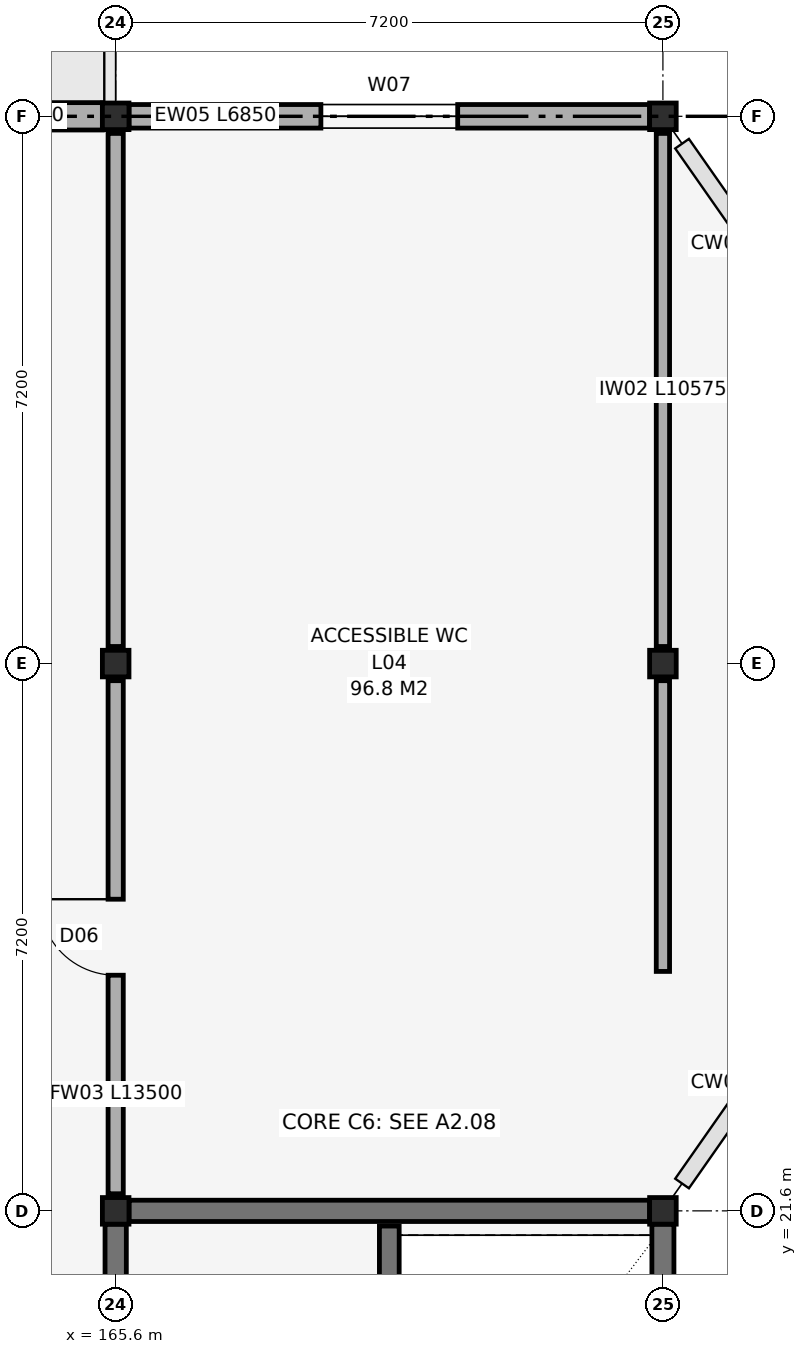
"""IFC4 building model, lengths in metres.
Left out: names, types, materials, properties, quantities, classifications, styles, units other than length and angle.
Written with IfcOpenShell. Run it as: python <this file> out.ifc"""

import sys

from ifc_helpers import new_model, si_unit, direction, frame, frame_2d, origin, origin_2d, place, context, subcontext, project, spatial, rectangle, i_section, extrude, element, fill, save


model = new_model("IFC4")
c1 = context("Model", 3, precision=1e-05, world=origin(), true_north=direction((0.0, 1.0)))
c2 = subcontext(c1, "Body", "Model", "MODEL_VIEW")
j1 = project(units=[si_unit("LENGTHUNIT", "METRE"), si_unit("PLANEANGLEUNIT", "RADIAN")], contexts=[c1])
p1 = place(None, origin())
s1 = spatial("IfcSite", under=j1, at=p1, CompositionType="ELEMENT")
p2 = place(p1, origin())
s2 = spatial("IfcBuilding", under=s1, at=p2, CompositionType="ELEMENT")
p3 = place(p2, frame((0.0, 0.0, 19.2)))
s3 = spatial("IfcBuildingStorey", under=s2, at=p3, CompositionType="ELEMENT", Elevation=19.2)
for number, where, z_axis, x_axis in (
    (1, (165.6, 21.6, 0.0), (0.0, 0.0, 1.0), (1.0, 0.0, 0.0)),
    (2, (165.6, 28.8, 0.0), (0.0, 0.0, 1.0), (1.0, 0.0, 0.0)),
    (3, (165.6, 36.0, 0.0), (0.0, 0.0, 1.0), (1.0, 0.0, 0.0)),
    (4, (172.8, 21.6, 0.0), (0.0, 0.0, 1.0), (1.0, 0.0, 0.0)),
    (5, (172.8, 28.8, 0.0), (0.0, 0.0, 1.0), (1.0, 0.0, 0.0)),
    (6, (172.8, 36.0, 0.0), (0.0, 0.0, 1.0), (1.0, 0.0, 0.0)),
):
    element("IfcColumn", number, at=place(p3, frame(where, z_axis=z_axis, x_axis=x_axis)), inside=s3, PredefinedType="COLUMN", context=c2, shape_type="SweptSolid", body=[
        extrude(i_section(OverallWidth=0.35, OverallDepth=0.35, WebThickness=0.012, FlangeThickness=0.019, FilletRadius=0.02, at=origin_2d()), origin(), (0.0, 0.0, 1.0), 4.2),
    ])
p4 = place(p3, frame((158.575, 36.0, 0.0), z_axis=(0.0, 0.0, 1.0), x_axis=(1.0, 0.0, 0.0)))
e7 = element("IfcWall", 7, at=p4, inside=s3, PredefinedType="SOLIDWALL", context=c2, shape_type="SweptSolid", body=[
    extrude(rectangle(XDim=6.85, YDim=0.36, at=frame_2d((3.425, 0.0))), origin(), (0.0, 0.0, 1.0), 3.64),
])
p5 = place(p4, frame((2.875, 0.0, 0.0)))
e8 = element("IfcOpeningElement", 8, at=p5, cuts=e7, PredefinedType="OPENING", context=c2, shape_type="SweptSolid", body=[
    extrude(rectangle(XDim=1.1, YDim=2.2, at=frame_2d((0.55, 1.1))), frame((0.0, 0.195, 0.0), z_axis=(0.0, -1.0, 0.0), x_axis=(1.0, 0.0, 0.0)), (0.0, 0.0, 1.0), 0.39),
])
p6 = place(p3, frame((165.775, 36.0, 0.0), z_axis=(0.0, 0.0, 1.0), x_axis=(1.0, 0.0, 0.0)))
e9 = element("IfcWall", 9, at=p6, inside=s3, PredefinedType="SOLIDWALL", context=c2, shape_type="SweptSolid", body=[
    extrude(rectangle(XDim=6.85, YDim=0.31, at=frame_2d((3.425, 0.0))), origin(), (0.0, 0.0, 1.0), 3.64),
])
p7 = place(p6, frame((2.525, 0.0, 0.95)))
e10 = element("IfcOpeningElement", 10, at=p7, cuts=e9, PredefinedType="OPENING", context=c2, shape_type="SweptSolid", body=[
    extrude(rectangle(XDim=1.8, YDim=2.0, at=frame_2d((0.9, 1.0))), frame((0.0, 0.17, 0.0), z_axis=(0.0, -1.0, 0.0), x_axis=(1.0, 0.0, 0.0)), (0.0, 0.0, 1.0), 0.34),
])
p8 = place(p3, frame((165.775, 21.6, 0.0), z_axis=(0.0, 0.0, 1.0), x_axis=(1.0, 0.0, 0.0)))
e11 = element("IfcWall", 11, at=p8, inside=s3, PredefinedType="SHEAR", context=c2, shape_type="SweptSolid", body=[
    extrude(rectangle(XDim=6.85, YDim=0.28, at=frame_2d((3.425, 0.0))), origin(), (0.0, 0.0, 1.0), 3.98),
])
p9 = place(p3, frame((165.6, 14.644, 0.0), z_axis=(0.0, 0.0, 1.0), x_axis=(0.0, 1.0, 0.0)))
e12 = element("IfcWall", 12, at=p9, inside=s3, PredefinedType="SHEAR", context=c2, shape_type="SweptSolid", body=[
    extrude(rectangle(XDim=6.781, YDim=0.28, at=frame_2d((3.391, 0.0))), origin(), (0.0, 0.0, 1.0), 3.98),
])
p10 = place(p9, frame((2.591, 0.0, 0.0)))
e13 = element("IfcOpeningElement", 13, at=p10, cuts=e12, PredefinedType="OPENING", context=c2, shape_type="SweptSolid", body=[
    extrude(rectangle(XDim=1.6, YDim=2.2, at=frame_2d((0.8, 1.1))), frame((0.0, 0.155, 0.0), z_axis=(0.0, -1.0, 0.0), x_axis=(1.0, 0.0, 0.0)), (0.0, 0.0, 1.0), 0.31),
])
p11 = place(p3, frame((172.8, 14.575, 0.0), z_axis=(0.0, 0.0, 1.0), x_axis=(0.0, 1.0, 0.0)))
e14 = element("IfcWall", 14, at=p11, inside=s3, PredefinedType="SHEAR", context=c2, shape_type="SweptSolid", body=[
    extrude(rectangle(XDim=6.85, YDim=0.29, at=frame_2d((3.425, 0.0))), origin(), (0.0, 0.0, 1.0), 3.98),
])
p12 = place(p3, frame((169.2, 7.4, 0.0), z_axis=(0.0, 0.0, 1.0), x_axis=(0.0, 1.0, 0.0)))
e15 = element("IfcWall", 15, at=p12, inside=s3, PredefinedType="SHEAR", context=c2, shape_type="SweptSolid", body=[
    extrude(rectangle(XDim=14.0, YDim=0.26, at=frame_2d((7.0, 0.0))), origin(), (0.0, 0.0, 1.0), 3.98),
])
p13 = place(p12, frame((1.65, 0.0, 0.0)))
e16 = element("IfcOpeningElement", 16, at=p13, cuts=e15, PredefinedType="OPENING", context=c2, shape_type="SweptSolid", body=[
    extrude(rectangle(XDim=1.1, YDim=2.15, at=frame_2d((0.55, 1.075))), frame((0.0, 0.145, 0.0), z_axis=(0.0, -1.0, 0.0), x_axis=(1.0, 0.0, 0.0)), (0.0, 0.0, 1.0), 0.29),
])
p14 = place(p12, frame((10.6, 0.0, 0.0)))
e17 = element("IfcOpeningElement", 17, at=p14, cuts=e15, PredefinedType="OPENING", context=c2, shape_type="SweptSolid", body=[
    extrude(rectangle(XDim=1.2, YDim=2.25, at=frame_2d((0.6, 1.125))), frame((0.0, 0.145, 0.0), z_axis=(0.0, -1.0, 0.0), x_axis=(1.0, 0.0, 0.0)), (0.0, 0.0, 1.0), 0.29),
])
p15 = place(p3, frame((165.6, 21.825, 0.0), z_axis=(0.0, 0.0, 1.0), x_axis=(0.0, 1.0, 0.0)))
e18 = element("IfcWall", 18, at=p15, inside=s3, PredefinedType="SOLIDWALL", context=c2, shape_type="SweptSolid", body=[
    extrude(rectangle(XDim=6.75, YDim=0.2, at=frame_2d((3.375, 0.0))), origin(), (0.0, 0.0, 1.0), 3.64),
])
p16 = place(p15, frame((2.875, 0.0, 0.0)))
e19 = element("IfcOpeningElement", 19, at=p16, cuts=e18, PredefinedType="OPENING", context=c2, shape_type="SweptSolid", body=[
    extrude(rectangle(XDim=1.0, YDim=2.1, at=frame_2d((0.5, 1.05))), frame((0.0, 0.115, 0.0), z_axis=(0.0, -1.0, 0.0), x_axis=(1.0, 0.0, 0.0)), (0.0, 0.0, 1.0), 0.23),
])
p17 = place(p3, frame((165.6, 29.025, 0.0), z_axis=(0.0, 0.0, 1.0), x_axis=(0.0, 1.0, 0.0)))
e20 = element("IfcWall", 20, at=p17, inside=s3, PredefinedType="SOLIDWALL", context=c2, shape_type="SweptSolid", body=[
    extrude(rectangle(XDim=6.75, YDim=0.2, at=frame_2d((3.375, 0.0))), origin(), (0.0, 0.0, 1.0), 3.64),
])
p18 = place(p3, frame((172.8, 24.75, 0.0), z_axis=(0.0, 0.0, 1.0), x_axis=(0.0, 1.0, 0.0)))
e21 = element("IfcWall", 21, at=p18, inside=s3, PredefinedType="PARTITIONING", context=c2, shape_type="SweptSolid", body=[
    extrude(rectangle(XDim=3.825, YDim=0.175, at=frame_2d((1.913, 0.0))), origin(), (0.0, 0.0, 1.0), 3.64),
])
p19 = place(p3, frame((172.8, 29.025, 0.0), z_axis=(0.0, 0.0, 1.0), x_axis=(0.0, 1.0, 0.0)))
e22 = element("IfcWall", 22, at=p19, inside=s3, PredefinedType="PARTITIONING", context=c2, shape_type="SweptSolid", body=[
    extrude(rectangle(XDim=6.75, YDim=0.175, at=frame_2d((3.375, 0.0))), origin(), (0.0, 0.0, 1.0), 3.68),
])
p20 = place(p7, origin())
e23 = element("IfcWindow", 23, at=p20, inside=s3, PartitioningType="SINGLE_PANEL", PredefinedType="WINDOW", context=c2, shape_type="SweptSolid", body=[
    extrude(rectangle(XDim=1.8, YDim=2.0, at=frame_2d((0.9, 1.0))), frame((0.0, 0.03, 0.0), z_axis=(0.0, -1.0, 0.0), x_axis=(1.0, 0.0, 0.0)), (0.0, 0.0, 1.0), 0.06),
])
fill(e10, e23)
p21 = place(p16, frame((1.0, 0.0, 0.0), z_axis=(0.0, 0.0, 1.0), x_axis=(-1.0, 0.0, 0.0)))
e24 = element("IfcDoor", 24, at=p21, inside=s3, OperationType="SINGLE_SWING_LEFT", PredefinedType="DOOR", context=c2, shape_type="SweptSolid", body=[
    extrude(rectangle(XDim=1.0, YDim=2.1, at=frame_2d((0.5, 1.05))), frame((0.0, 0.025, 0.0), z_axis=(0.0, -1.0, 0.0), x_axis=(1.0, 0.0, 0.0)), (0.0, 0.0, 1.0), 0.05),
])
fill(e19, e24)
save(model, sys.argv[1])
